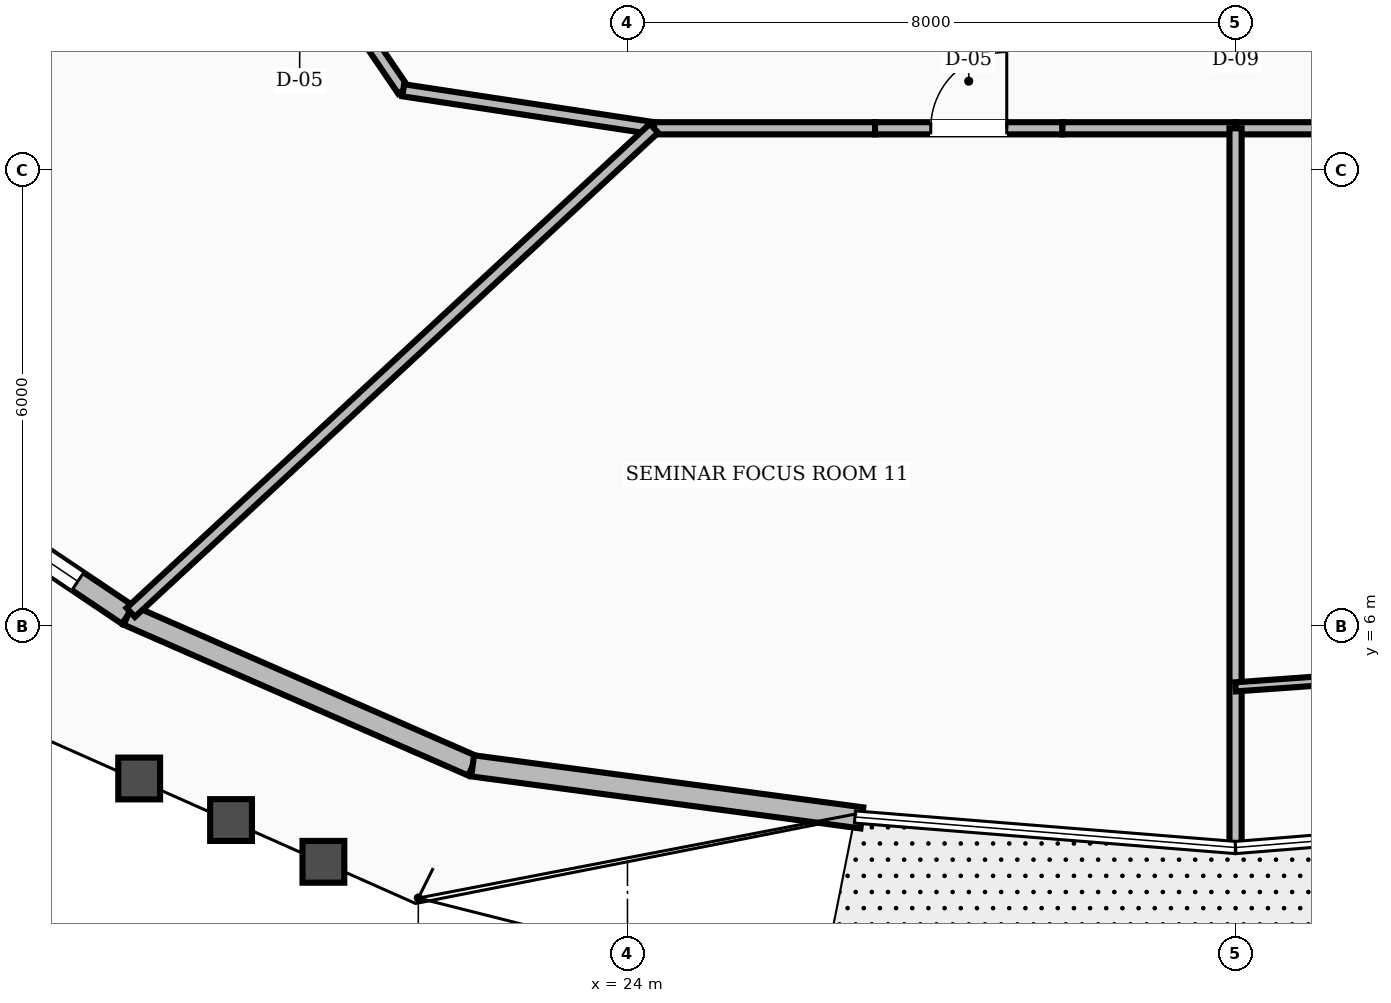
"""IFC4 building model, lengths in metres.
Left out: names, types, materials, properties, quantities, classifications, styles, units other than length and angle.
Written with IfcOpenShell. Run it as: python <this file> out.ifc"""

import sys

from ifc_helpers import new_model, si_unit, direction, frame, frame_2d, origin, place, context, subcontext, project, spatial, rectangle, extrude, element, fill, save


model = new_model("IFC4")
c1 = context("Model", 3, precision=1e-05, world=origin(), true_north=direction((0.0, 1.0)))
c2 = subcontext(c1, "Body", "Model", "MODEL_VIEW")
j1 = project(units=[si_unit("LENGTHUNIT", "METRE"), si_unit("PLANEANGLEUNIT", "RADIAN")], contexts=[c1])
p1 = place(None, origin())
s1 = spatial("IfcSite", under=j1, at=p1, CompositionType="ELEMENT")
p2 = place(p1, origin())
s2 = spatial("IfcBuilding", under=s1, at=p2, CompositionType="ELEMENT")
p3 = place(p2, frame((0.0, 0.0, 160.4)))
s3 = spatial("IfcBuildingStorey", under=s2, at=p3, CompositionType="ELEMENT", Elevation=160.4)
p4 = place(p3, frame((13.453, 8.817, 0.0), z_axis=(0.0, 0.0, 1.0), x_axis=(0.830052550014, -0.557685183787, 0.0)))
e1 = element("IfcWall", 1, at=p4, inside=s3, PredefinedType="STANDARD", context=c2, shape_type="SweptSolid", body=[
    extrude(rectangle(XDim=4.788, YDim=0.28, at=frame_2d((2.394, 0.0))), origin(), (0.0, 0.0, 1.0), 2.82),
])
p5 = place(p4, frame((0.794, 0.0, 0.8)))
e2 = element("IfcOpeningElement", 2, at=p5, cuts=e1, PredefinedType="OPENING", context=c2, shape_type="SweptSolid", body=[
    extrude(rectangle(XDim=3.2, YDim=1.65, at=frame_2d((1.6, 0.825))), frame((0.0, 0.15, 0.0), z_axis=(0.0, -1.0, 0.0), x_axis=(1.0, 0.0, 0.0)), (0.0, 0.0, 1.0), 0.3),
])
p6 = place(p3, frame((17.428, 6.146, 0.0), z_axis=(0.0, 0.0, 1.0), x_axis=(0.916141485862, -0.400855058447, 0.0)))
e3 = element("IfcWall", 3, at=p6, inside=s3, PredefinedType="STANDARD", context=c2, shape_type="SweptSolid", body=[
    extrude(rectangle(XDim=4.95, YDim=0.28, at=frame_2d((2.475, 0.0))), origin(), (0.0, 0.0, 1.0), 2.82),
])
p7 = place(p3, frame((21.963, 4.162, 0.0), z_axis=(0.0, 0.0, 1.0), x_axis=(0.99117002713, -0.132597048683, 0.0)))
e4 = element("IfcWall", 4, at=p7, inside=s3, PredefinedType="STANDARD", context=c2, shape_type="SweptSolid", body=[
    extrude(rectangle(XDim=5.167, YDim=0.28, at=frame_2d((2.583, 0.0))), origin(), (0.0, 0.0, 1.0), 2.82),
])
p8 = place(p3, frame((19.35, 15.548, 0.0), z_axis=(0.0, 0.0, 1.0), x_axis=(0.562674669208, -0.826678423955, 0.0)))
e5 = element("IfcWall", 5, at=p8, inside=s3, PredefinedType="SOLIDWALL", context=c2, shape_type="SweptSolid", body=[
    extrude(rectangle(XDim=3.021, YDim=0.16, at=frame_2d((1.511, 0.0))), origin(), (0.0, 0.0, 1.0), 2.8),
])
p9 = place(p8, frame((1.01, 0.0, 0.0)))
e6 = element("IfcOpeningElement", 6, at=p9, cuts=e5, PredefinedType="OPENING", context=c2, shape_type="SweptSolid", body=[
    extrude(rectangle(XDim=1.0, YDim=2.1, at=frame_2d((0.5, 1.05))), frame((0.0, 0.09, 0.0), z_axis=(0.0, -1.0, 0.0), x_axis=(1.0, 0.0, 0.0)), (0.0, 0.0, 1.0), 0.18),
])
p10 = place(p3, frame((21.05, 13.05, 0.0), z_axis=(0.0, 0.0, 1.0), x_axis=(0.988710906508, -0.149835721217, 0.0)))
e7 = element("IfcWall", 7, at=p10, inside=s3, PredefinedType="SOLIDWALL", context=c2, shape_type="SweptSolid", body=[
    extrude(rectangle(XDim=3.337, YDim=0.16, at=frame_2d((1.668, 0.0))), origin(), (0.0, 0.0, 1.0), 2.8),
])
p11 = place(p3, frame((24.349, 12.55, 0.0), z_axis=(0.0, 0.0, 1.0), x_axis=(1.0, 0.0, 0.0)))
e8 = element("IfcWall", 8, at=p11, inside=s3, PredefinedType="SOLIDWALL", context=c2, shape_type="SweptSolid", body=[
    extrude(rectangle(XDim=2.908, YDim=0.16, at=frame_2d((1.454, 0.0))), origin(), (0.0, 0.0, 1.0), 2.8),
])
p12 = place(p3, frame((27.257, 12.55, 0.0), z_axis=(0.0, 0.0, 1.0), x_axis=(1.0, 0.0, 0.0)))
e9 = element("IfcWall", 9, at=p12, inside=s3, PredefinedType="SOLIDWALL", context=c2, shape_type="SweptSolid", body=[
    extrude(rectangle(XDim=2.465, YDim=0.16, at=frame_2d((1.232, 0.0))), origin(), (0.0, 0.0, 1.0), 2.8),
])
p13 = place(p12, frame((0.733, 0.0, 0.0)))
e10 = element("IfcOpeningElement", 10, at=p13, cuts=e9, PredefinedType="OPENING", context=c2, shape_type="SweptSolid", body=[
    extrude(rectangle(XDim=1.0, YDim=2.1, at=frame_2d((0.5, 1.05))), frame((0.0, 0.09, 0.0), z_axis=(0.0, -1.0, 0.0), x_axis=(1.0, 0.0, 0.0)), (0.0, 0.0, 1.0), 0.18),
])
for number, where, z_axis, x_axis in (
    (11, (29.722, 12.55, 0.0), (0.0, 0.0, 1.0), (1.0, 0.0, 0.0)),
    (12, (32.0, 12.55, 0.0), (0.0, 0.0, 1.0), (1.0, 0.0, 0.0)),
):
    element("IfcWall", number, at=place(p3, frame(where, z_axis=z_axis, x_axis=x_axis)), inside=s3, PredefinedType="SOLIDWALL", context=c2, shape_type="SweptSolid", body=[
        extrude(rectangle(XDim=2.278, YDim=0.16, at=frame_2d((1.139, 0.0))), origin(), (0.0, 0.0, 1.0), 2.8),
    ])
p14 = place(p3, frame((24.349, 12.55, 0.0), z_axis=(0.0, 0.0, 1.0), x_axis=(-0.734022554493, -0.679125091199, 0.0)))
e13 = element("IfcWall", 13, at=p14, inside=s3, PredefinedType="SOLIDWALL", context=c2, shape_type="SweptSolid", body=[
    extrude(rectangle(XDim=9.379, YDim=0.16, at=frame_2d((4.689, 0.0))), origin(), (0.0, 0.0, 1.0), 2.8),
])
p15 = place(p3, frame((32.0, 12.55, 0.0), z_axis=(0.0, 0.0, 1.0), x_axis=(0.0, -1.0, 0.0)))
e14 = element("IfcWall", 14, at=p15, inside=s3, PredefinedType="SOLIDWALL", context=c2, shape_type="SweptSolid", body=[
    extrude(rectangle(XDim=9.412, YDim=0.16, at=frame_2d((4.706, 0.0))), origin(), (0.0, 0.0, 1.0), 2.8),
])
p16 = place(p3, frame((32.0, 5.201, 0.0), z_axis=(0.0, 0.0, 1.0), x_axis=(0.997492598999, 0.07077086224, 0.0)))
e15 = element("IfcWall", 15, at=p16, inside=s3, PredefinedType="PARTITIONING", context=c2, shape_type="SweptSolid", body=[
    extrude(rectangle(XDim=4.409, YDim=0.12, at=frame_2d((2.204, 0.0))), origin(), (0.0, 0.0, 1.0), 2.8),
])
p17 = place(p16, frame((1.729, 0.0, 0.0)))
e16 = element("IfcOpeningElement", 16, at=p17, cuts=e15, PredefinedType="OPENING", context=c2, shape_type="SweptSolid", body=[
    extrude(rectangle(XDim=0.95, YDim=2.1, at=frame_2d((0.475, 1.05))), frame((0.0, 0.07, 0.0), z_axis=(0.0, -1.0, 0.0), x_axis=(1.0, 0.0, 0.0)), (0.0, 0.0, 1.0), 0.14),
])
p18 = place(p5, origin())
e17 = element("IfcWindow", 17, at=p18, inside=s3, PartitioningType="SINGLE_PANEL", PredefinedType="WINDOW", context=c2, shape_type="SweptSolid", body=[
    extrude(rectangle(XDim=3.2, YDim=1.65, at=frame_2d((1.6, 0.825))), frame((0.0, 0.03, 0.0), z_axis=(0.0, -1.0, 0.0), x_axis=(1.0, 0.0, 0.0)), (0.0, 0.0, 1.0), 0.06),
])
fill(e2, e17)
p19 = place(p13, origin())
e18 = element("IfcDoor", 18, at=p19, inside=s3, OperationType="SINGLE_SWING_RIGHT", PredefinedType="DOOR", context=c2, shape_type="SweptSolid", body=[
    extrude(rectangle(XDim=1.0, YDim=2.1, at=frame_2d((0.5, 1.05))), frame((0.0, 0.025, 0.0), z_axis=(0.0, -1.0, 0.0), x_axis=(1.0, 0.0, 0.0)), (0.0, 0.0, 1.0), 0.05),
])
fill(e10, e18)
save(model, sys.argv[1])
